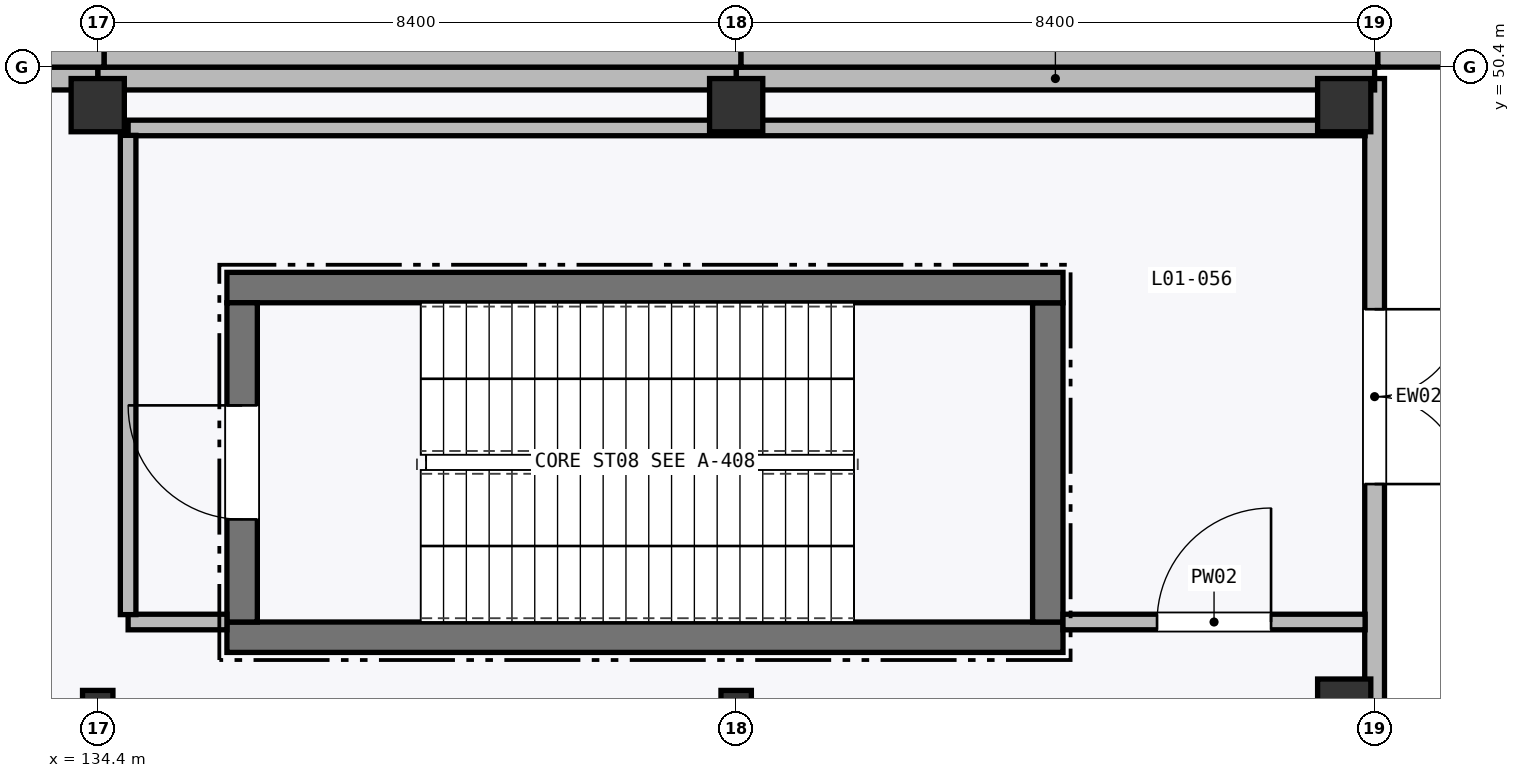
"""IFC4 building model, lengths in metres.
Left out: names, types, materials, properties, quantities, classifications, styles, units other than length and angle.
Written with IfcOpenShell. Run it as: python <this file> out.ifc"""

import sys

from ifc_helpers import new_model, si_unit, direction, frame, frame_2d, origin, origin_2d, place, context, subcontext, project, spatial, rectangle, i_section, extrude, element, fill, save


model = new_model("IFC4")
c1 = context("Model", 3, precision=1e-05, world=origin(), true_north=direction((0.0, 1.0)))
c2 = subcontext(c1, "Body", "Model", "MODEL_VIEW")
j1 = project(units=[si_unit("LENGTHUNIT", "METRE"), si_unit("PLANEANGLEUNIT", "RADIAN")], contexts=[c1])
p1 = place(None, origin())
s1 = spatial("IfcSite", under=j1, at=p1, CompositionType="ELEMENT")
p2 = place(p1, origin())
s2 = spatial("IfcBuilding", under=s1, at=p2, CompositionType="ELEMENT")
p3 = place(p2, origin())
s3 = spatial("IfcBuildingStorey", under=s2, at=p3, CompositionType="ELEMENT", Elevation=0.0)
p4 = place(p3, frame((134.4, 42.0, 0.0), z_axis=(0.0, 0.0, 1.0), x_axis=(1.0, 0.0, 0.0)))
e1 = element("IfcColumn", 1, at=p4, inside=s3, PredefinedType="COLUMN", context=c2, shape_type="SweptSolid", body=[
    extrude(i_section(OverallWidth=0.4, OverallDepth=0.4, WebThickness=0.013, FlangeThickness=0.021, FilletRadius=0.022, at=origin_2d()), origin(), (0.0, 0.0, 1.0), 6.0),
])
p5 = place(p3, frame((134.4, 49.9, 0.0), z_axis=(0.0, 0.0, 1.0), x_axis=(1.0, 0.0, 0.0)))
e2 = element("IfcColumn", 2, at=p5, inside=s3, PredefinedType="COLUMN", context=c2, shape_type="SweptSolid", body=[
    extrude(rectangle(XDim=0.7, YDim=0.7, at=origin_2d()), origin(), (0.0, 0.0, 1.0), 6.0),
])
p6 = place(p3, frame((142.8, 42.0, 0.0), z_axis=(0.0, 0.0, 1.0), x_axis=(1.0, 0.0, 0.0)))
e3 = element("IfcColumn", 3, at=p6, inside=s3, PredefinedType="COLUMN", context=c2, shape_type="SweptSolid", body=[
    extrude(i_section(OverallWidth=0.4, OverallDepth=0.4, WebThickness=0.013, FlangeThickness=0.021, FilletRadius=0.022, at=origin_2d()), origin(), (0.0, 0.0, 1.0), 6.0),
])
for number, where, z_axis, x_axis in (
    (4, (142.8, 49.9, 0.0), (0.0, 0.0, 1.0), (1.0, 0.0, 0.0)),
    (5, (150.8, 42.0, 0.0), (0.0, 0.0, 1.0), (1.0, 0.0, 0.0)),
    (6, (150.8, 49.9, 0.0), (0.0, 0.0, 1.0), (1.0, 0.0, 0.0)),
):
    element("IfcColumn", number, at=place(p3, frame(where, z_axis=z_axis, x_axis=x_axis)), inside=s3, PredefinedType="COLUMN", context=c2, shape_type="SweptSolid", body=[
        extrude(rectangle(XDim=0.7, YDim=0.7, at=origin_2d()), origin(), (0.0, 0.0, 1.0), 6.0),
    ])
p7 = place(p3, frame((151.2, 41.88, 0.0), z_axis=(0.0, 0.0, 1.0), x_axis=(0.0, 1.0, 0.0)))
e7 = element("IfcWall", 7, at=p7, inside=s3, PredefinedType="STANDARD", context=c2, shape_type="SweptSolid", body=[
    extrude(rectangle(XDim=8.37, YDim=0.26, at=frame_2d((4.185, 0.0))), origin(), (0.0, 0.0, 1.0), 5.745),
])
p8 = place(p7, frame((3.035, 0.0, 0.0)))
e8 = element("IfcOpeningElement", 8, at=p8, cuts=e7, PredefinedType="OPENING", context=c2, shape_type="SweptSolid", body=[
    extrude(rectangle(XDim=2.3, YDim=2.4, at=frame_2d((1.15, 1.2))), frame((0.0, 0.14, 0.0), z_axis=(0.0, -1.0, 0.0), x_axis=(1.0, 0.0, 0.0)), (0.0, 0.0, 1.0), 0.28),
])
p9 = place(p3, frame((151.2, 50.25, 0.0), z_axis=(0.0, 0.0, 1.0), x_axis=(-1.0, 0.0, 0.0)))
e9 = element("IfcWall", 9, at=p9, inside=s3, PredefinedType="STANDARD", context=c2, shape_type="SweptSolid", body=[
    extrude(rectangle(XDim=8.4, YDim=0.3, at=frame_2d((4.2, 0.0))), origin(), (0.0, 0.0, 1.0), 5.231),
])
p10 = place(p3, frame((142.8, 50.25, 0.0), z_axis=(0.0, 0.0, 1.0), x_axis=(-1.0, 0.0, 0.0)))
e10 = element("IfcWall", 10, at=p10, inside=s3, PredefinedType="STANDARD", context=c2, shape_type="SweptSolid", body=[
    extrude(rectangle(XDim=8.4, YDim=0.3, at=frame_2d((4.2, 0.0))), origin(), (0.0, 0.0, 1.0), 5.231),
])
p11 = place(p3, frame((134.4, 50.25, 0.0), z_axis=(0.0, 0.0, 1.0), x_axis=(-1.0, 0.0, 0.0)))
e11 = element("IfcWall", 11, at=p11, inside=s3, PredefinedType="STANDARD", context=c2, shape_type="SweptSolid", body=[
    extrude(rectangle(XDim=8.4, YDim=0.3, at=frame_2d((4.2, 0.0))), origin(), (0.0, 0.0, 1.0), 5.231),
])
p12 = place(p3, frame((126.107, 50.55, 0.0), z_axis=(0.0, 0.0, 1.0), x_axis=(1.0, 0.0, 0.0)))
e12 = element("IfcWall", 12, at=p12, inside=s3, PredefinedType="STANDARD", context=c2, shape_type="SweptSolid", body=[
    extrude(rectangle(XDim=8.378, YDim=0.3, at=frame_2d((4.189, 0.0))), origin(), (0.0, 0.0, 1.0), 5.297),
])
for number, where, z_axis, x_axis in (
    (13, (134.486, 50.55, 0.0), (0.0, 0.0, 1.0), (1.0, 0.0, 0.0)),
    (14, (142.864, 50.55, 0.0), (0.0, 0.0, 1.0), (1.0, 0.0, 0.0)),
):
    element("IfcWall", number, at=place(p3, frame(where, z_axis=z_axis, x_axis=x_axis)), inside=s3, PredefinedType="STANDARD", context=c2, shape_type="SweptSolid", body=[
        extrude(rectangle(XDim=8.379, YDim=0.3, at=frame_2d((4.189, 0.0))), origin(), (0.0, 0.0, 1.0), 5.297),
    ])
p13 = place(p3, frame((151.243, 50.55, 0.0), z_axis=(0.0, 0.0, 1.0), x_axis=(1.0, 0.0, 0.0)))
e15 = element("IfcWall", 15, at=p13, inside=s3, PredefinedType="STANDARD", context=c2, shape_type="SweptSolid", body=[
    extrude(rectangle(XDim=8.378, YDim=0.3, at=frame_2d((4.189, 0.0))), origin(), (0.0, 0.0, 1.0), 5.297),
])
p14 = place(p3, frame((136.1, 42.9, 0.0), z_axis=(0.0, 0.0, 1.0), x_axis=(1.0, 0.0, 0.0)))
e16 = element("IfcWall", 16, at=p14, inside=s3, PredefinedType="SHEAR", context=c2, shape_type="SweptSolid", body=[
    extrude(rectangle(XDim=11.0, YDim=0.4, at=frame_2d((5.5, 0.0))), origin(), (0.0, 0.0, 1.0), 5.745),
])
p15 = place(p3, frame((146.9, 43.1, 0.0), z_axis=(0.0, 0.0, 1.0), x_axis=(0.0, 1.0, 0.0)))
e17 = element("IfcWall", 17, at=p15, inside=s3, PredefinedType="SHEAR", context=c2, shape_type="SweptSolid", body=[
    extrude(rectangle(XDim=4.2, YDim=0.4, at=frame_2d((2.1, 0.0))), origin(), (0.0, 0.0, 1.0), 5.745),
])
p16 = place(p3, frame((147.1, 47.5, 0.0), z_axis=(0.0, 0.0, 1.0), x_axis=(-1.0, 0.0, 0.0)))
e18 = element("IfcWall", 18, at=p16, inside=s3, PredefinedType="SHEAR", context=c2, shape_type="SweptSolid", body=[
    extrude(rectangle(XDim=11.0, YDim=0.4, at=frame_2d((5.5, 0.0))), origin(), (0.0, 0.0, 1.0), 5.745),
])
p17 = place(p3, frame((136.3, 47.3, 0.0), z_axis=(0.0, 0.0, 1.0), x_axis=(0.0, -1.0, 0.0)))
e19 = element("IfcWall", 19, at=p17, inside=s3, PredefinedType="SHEAR", context=c2, shape_type="SweptSolid", body=[
    extrude(rectangle(XDim=4.2, YDim=0.4, at=frame_2d((2.1, 0.0))), origin(), (0.0, 0.0, 1.0), 5.745),
])
p18 = place(p17, frame((1.35, 0.0, 0.0)))
e20 = element("IfcOpeningElement", 20, at=p18, cuts=e19, PredefinedType="OPENING", context=c2, shape_type="SweptSolid", body=[
    extrude(rectangle(XDim=1.5, YDim=2.15, at=frame_2d((0.75, 1.075))), frame((0.0, 0.21, 0.0), z_axis=(0.0, -1.0, 0.0), x_axis=(1.0, 0.0, 0.0)), (0.0, 0.0, 1.0), 0.42),
])
p19 = place(p3, frame((134.8, 43.1, 0.0), z_axis=(0.0, 0.0, 1.0), x_axis=(1.0, 0.0, 0.0)))
e21 = element("IfcWall", 21, at=p19, inside=s3, PredefinedType="PARTITIONING", context=c2, shape_type="SweptSolid", body=[
    extrude(rectangle(XDim=1.3, YDim=0.205, at=frame_2d((0.65, 0.0))), origin(), (0.0, 0.0, 1.0), 5.745),
])
p20 = place(p3, frame((147.1, 43.1, 0.0), z_axis=(0.0, 0.0, 1.0), x_axis=(1.0, 0.0, 0.0)))
e22 = element("IfcWall", 22, at=p20, inside=s3, PredefinedType="PARTITIONING", context=c2, shape_type="SweptSolid", body=[
    extrude(rectangle(XDim=3.975, YDim=0.205, at=frame_2d((1.987, 0.0))), origin(), (0.0, 0.0, 1.0), 5.745),
])
p21 = place(p20, frame((1.238, 0.0, 0.0)))
e23 = element("IfcOpeningElement", 23, at=p21, cuts=e22, PredefinedType="OPENING", context=c2, shape_type="SweptSolid", body=[
    extrude(rectangle(XDim=1.5, YDim=2.15, at=frame_2d((0.75, 1.075))), frame((0.0, 0.113, 0.0), z_axis=(0.0, -1.0, 0.0), x_axis=(1.0, 0.0, 0.0)), (0.0, 0.0, 1.0), 0.225),
])
p22 = place(p3, frame((151.075, 49.6, 0.0), z_axis=(0.0, 0.0, 1.0), x_axis=(-1.0, 0.0, 0.0)))
e24 = element("IfcWall", 24, at=p22, inside=s3, PredefinedType="PARTITIONING", context=c2, shape_type="SweptSolid", body=[
    extrude(rectangle(XDim=16.275, YDim=0.205, at=frame_2d((8.137, 0.0))), origin(), (0.0, 0.0, 1.0), 5.231),
])
p23 = place(p3, frame((134.8, 49.502, 0.0), z_axis=(0.0, 0.0, 1.0), x_axis=(0.0, -1.0, 0.0)))
e25 = element("IfcWall", 25, at=p23, inside=s3, PredefinedType="PARTITIONING", context=c2, shape_type="SweptSolid", body=[
    extrude(rectangle(XDim=6.305, YDim=0.205, at=frame_2d((3.152, 0.0))), origin(), (0.0, 0.0, 1.0), 5.745),
])
p24 = place(p8, frame((2.3, 0.0, 0.0), z_axis=(0.0, 0.0, 1.0), x_axis=(-1.0, 0.0, 0.0)))
e26 = element("IfcDoor", 26, at=p24, inside=s3, OperationType="DOUBLE_DOOR_SINGLE_SWING", PredefinedType="DOOR", context=c2, shape_type="SweptSolid", body=[
    extrude(rectangle(XDim=2.3, YDim=2.4, at=frame_2d((1.15, 1.2))), frame((0.0, 0.025, 0.0), z_axis=(0.0, -1.0, 0.0), x_axis=(1.0, 0.0, 0.0)), (0.0, 0.0, 1.0), 0.05),
])
fill(e8, e26)
p25 = place(p18, frame((1.5, 0.0, 0.0), z_axis=(0.0, 0.0, 1.0), x_axis=(-1.0, 0.0, 0.0)))
e27 = element("IfcDoor", 27, at=p25, inside=s3, OperationType="SINGLE_SWING_LEFT", PredefinedType="DOOR", context=c2, shape_type="SweptSolid", body=[
    extrude(rectangle(XDim=1.5, YDim=2.15, at=frame_2d((0.75, 1.075))), frame((0.0, 0.025, 0.0), z_axis=(0.0, -1.0, 0.0), x_axis=(1.0, 0.0, 0.0)), (0.0, 0.0, 1.0), 0.05),
])
fill(e20, e27)
p26 = place(p21, origin())
e28 = element("IfcDoor", 28, at=p26, inside=s3, OperationType="SINGLE_SWING_RIGHT", PredefinedType="DOOR", context=c2, shape_type="SweptSolid", body=[
    extrude(rectangle(XDim=1.5, YDim=2.15, at=frame_2d((0.75, 1.075))), frame((0.0, 0.025, 0.0), z_axis=(0.0, -1.0, 0.0), x_axis=(1.0, 0.0, 0.0)), (0.0, 0.0, 1.0), 0.05),
])
fill(e23, e28)
save(model, sys.argv[1])
